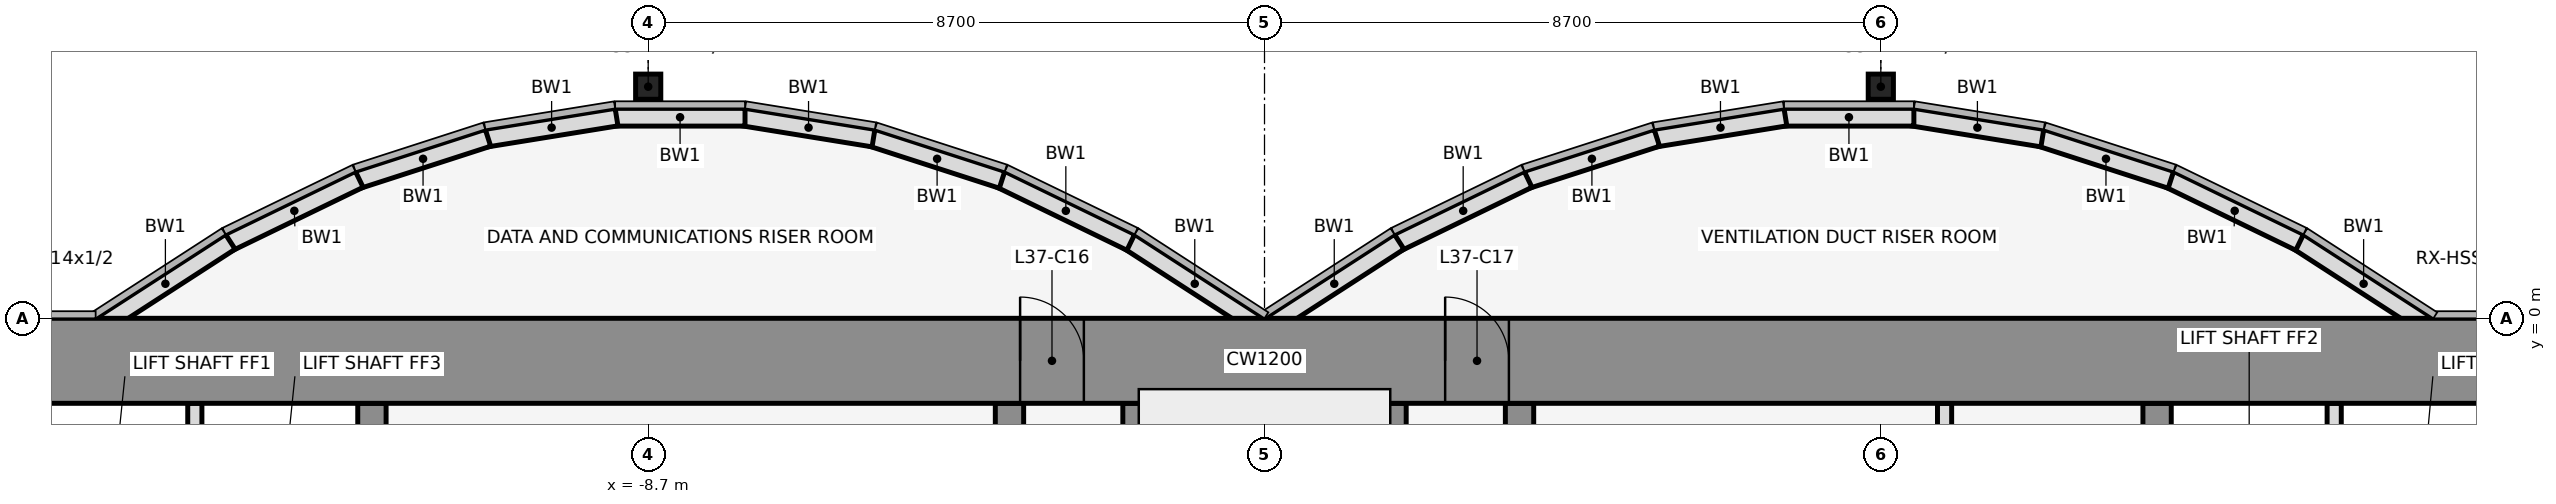
"""IFC4 building model, lengths in metres.
Left out: names, types, materials, properties, quantities, classifications, styles, units other than length and angle.
Written with IfcOpenShell. Run it as: python <this file> out.ifc"""

import sys

from ifc_helpers import new_model, si_unit, direction, frame, frame_2d, origin, origin_2d, place, context, subcontext, project, spatial, rectangle, hollow_rectangle, extrude, element, fill, save


model = new_model("IFC4")
c1 = context("Model", 3, precision=1e-05, world=origin(), true_north=direction((0.0, 1.0)))
c2 = subcontext(c1, "Body", "Model", "MODEL_VIEW")
j1 = project(units=[si_unit("LENGTHUNIT", "METRE"), si_unit("PLANEANGLEUNIT", "RADIAN")], contexts=[c1])
p1 = place(None, origin())
s1 = spatial("IfcSite", under=j1, at=p1, CompositionType="ELEMENT")
p2 = place(p1, origin())
s2 = spatial("IfcBuilding", under=s1, at=p2, CompositionType="ELEMENT")
p3 = place(p2, frame((0.0, 0.0, 169.1)))
s3 = spatial("IfcBuildingStorey", under=s2, at=p3, CompositionType="ELEMENT", Elevation=169.1)
for number, where, z_axis, x_axis in (
    (1, (-8.7, 3.269, 0.0), (0.0, 0.0, 1.0), (1.0, 0.0, 0.0)),
    (2, (8.7, 3.269, 0.0), (0.0, 0.0, 1.0), (1.0, 0.0, 0.0)),
):
    element("IfcColumn", number, at=place(p3, frame(where, z_axis=z_axis, x_axis=x_axis)), inside=s3, PredefinedType="COLUMN", context=c2, shape_type="SweptSolid", body=[
        extrude(hollow_rectangle(XDim=0.356, YDim=0.356, WallThickness=0.012, at=origin_2d()), origin(), (0.0, 0.0, 1.0), 4.1),
    ])
p4 = place(p3, frame((16.432, -0.105, 0.0), z_axis=(0.0, 0.0, 1.0), x_axis=(-0.83981312244, 0.542875602121, 0.0)))
e3 = element("IfcWall", 3, at=p4, inside=s3, PredefinedType="STANDARD", context=c2, shape_type="SweptSolid", body=[
    extrude(rectangle(XDim=2.183, YDim=0.25, at=frame_2d((1.091, 0.0))), origin(), (0.0, 0.0, 1.0), 3.95),
])
p5 = place(p3, frame((14.612, 1.073, 0.0), z_axis=(0.0, 0.0, 1.0), x_axis=(-0.89982408427, 0.436252928206, 0.0)))
e4 = element("IfcWall", 4, at=p5, inside=s3, PredefinedType="STANDARD", context=c2, shape_type="SweptSolid", body=[
    extrude(rectangle(XDim=2.038, YDim=0.25, at=frame_2d((1.019, 0.0))), origin(), (0.0, 0.0, 1.0), 3.95),
])
p6 = place(p3, frame((12.795, 1.955, 0.0), z_axis=(0.0, 0.0, 1.0), x_axis=(-0.951495806175, 0.307661714928, 0.0)))
e5 = element("IfcWall", 5, at=p6, inside=s3, PredefinedType="STANDARD", context=c2, shape_type="SweptSolid", body=[
    extrude(rectangle(XDim=1.927, YDim=0.25, at=frame_2d((0.963, 0.0))), origin(), (0.0, 0.0, 1.0), 3.95),
])
p7 = place(p3, frame((10.98, 2.543, 0.0), z_axis=(0.0, 0.0, 1.0), x_axis=(-0.987181718931, 0.159600293885, 0.0)))
e6 = element("IfcWall", 6, at=p7, inside=s3, PredefinedType="STANDARD", context=c2, shape_type="SweptSolid", body=[
    extrude(rectangle(XDim=1.857, YDim=0.25, at=frame_2d((0.929, 0.0))), origin(), (0.0, 0.0, 1.0), 3.95),
])
p8 = place(p3, frame((9.167, 2.838, 0.0), z_axis=(0.0, 0.0, 1.0), x_axis=(-1.0, 0.0, 0.0)))
e7 = element("IfcWall", 7, at=p8, inside=s3, PredefinedType="STANDARD", context=c2, shape_type="SweptSolid", body=[
    extrude(rectangle(XDim=1.833, YDim=0.25, at=frame_2d((0.917, 0.0))), origin(), (0.0, 0.0, 1.0), 3.95),
])
p9 = place(p3, frame((7.353, 2.84, 0.0), z_axis=(0.0, 0.0, 1.0), x_axis=(-0.987181718931, -0.159600293885, 0.0)))
e8 = element("IfcWall", 8, at=p9, inside=s3, PredefinedType="STANDARD", context=c2, shape_type="SweptSolid", body=[
    extrude(rectangle(XDim=1.857, YDim=0.25, at=frame_2d((0.929, 0.0))), origin(), (0.0, 0.0, 1.0), 3.95),
])
p10 = place(p3, frame((5.538, 2.548, 0.0), z_axis=(0.0, 0.0, 1.0), x_axis=(-0.951495806175, -0.307661714928, 0.0)))
e9 = element("IfcWall", 9, at=p10, inside=s3, PredefinedType="STANDARD", context=c2, shape_type="SweptSolid", body=[
    extrude(rectangle(XDim=1.927, YDim=0.25, at=frame_2d((0.963, 0.0))), origin(), (0.0, 0.0, 1.0), 3.95),
])
p11 = place(p3, frame((3.721, 1.962, 0.0), z_axis=(0.0, 0.0, 1.0), x_axis=(-0.89982408427, -0.436252928206, 0.0)))
e10 = element("IfcWall", 10, at=p11, inside=s3, PredefinedType="STANDARD", context=c2, shape_type="SweptSolid", body=[
    extrude(rectangle(XDim=2.038, YDim=0.25, at=frame_2d((1.019, 0.0))), origin(), (0.0, 0.0, 1.0), 3.95),
])
for number, where, z_axis, x_axis in (
    (11, (1.901, 1.08, 0.0), (0.0, 0.0, 1.0), (-0.84, -0.543, 0.0)),
    (12, (-0.068, -0.105, 0.0), (0.0, 0.0, 1.0), (-0.84, 0.543, 0.0)),
):
    element("IfcWall", number, at=place(p3, frame(where, z_axis=z_axis, x_axis=x_axis)), inside=s3, PredefinedType="STANDARD", context=c2, shape_type="SweptSolid", body=[
        extrude(rectangle(XDim=2.183, YDim=0.25, at=frame_2d((1.091, 0.0))), origin(), (0.0, 0.0, 1.0), 3.95),
    ])
p12 = place(p3, frame((-1.888, 1.073, 0.0), z_axis=(0.0, 0.0, 1.0), x_axis=(-0.89982408427, 0.436252928206, 0.0)))
e13 = element("IfcWall", 13, at=p12, inside=s3, PredefinedType="STANDARD", context=c2, shape_type="SweptSolid", body=[
    extrude(rectangle(XDim=2.038, YDim=0.25, at=frame_2d((1.019, 0.0))), origin(), (0.0, 0.0, 1.0), 3.95),
])
p13 = place(p3, frame((-3.705, 1.955, 0.0), z_axis=(0.0, 0.0, 1.0), x_axis=(-0.951495806175, 0.307661714928, 0.0)))
e14 = element("IfcWall", 14, at=p13, inside=s3, PredefinedType="STANDARD", context=c2, shape_type="SweptSolid", body=[
    extrude(rectangle(XDim=1.927, YDim=0.25, at=frame_2d((0.963, 0.0))), origin(), (0.0, 0.0, 1.0), 3.95),
])
p14 = place(p3, frame((-5.52, 2.543, 0.0), z_axis=(0.0, 0.0, 1.0), x_axis=(-0.987181718931, 0.159600293885, 0.0)))
e15 = element("IfcWall", 15, at=p14, inside=s3, PredefinedType="STANDARD", context=c2, shape_type="SweptSolid", body=[
    extrude(rectangle(XDim=1.857, YDim=0.25, at=frame_2d((0.929, 0.0))), origin(), (0.0, 0.0, 1.0), 3.95),
])
p15 = place(p3, frame((-7.333, 2.838, 0.0), z_axis=(0.0, 0.0, 1.0), x_axis=(-1.0, 0.0, 0.0)))
e16 = element("IfcWall", 16, at=p15, inside=s3, PredefinedType="STANDARD", context=c2, shape_type="SweptSolid", body=[
    extrude(rectangle(XDim=1.833, YDim=0.25, at=frame_2d((0.917, 0.0))), origin(), (0.0, 0.0, 1.0), 3.95),
])
p16 = place(p3, frame((-9.147, 2.84, 0.0), z_axis=(0.0, 0.0, 1.0), x_axis=(-0.987181718931, -0.159600293885, 0.0)))
e17 = element("IfcWall", 17, at=p16, inside=s3, PredefinedType="STANDARD", context=c2, shape_type="SweptSolid", body=[
    extrude(rectangle(XDim=1.857, YDim=0.25, at=frame_2d((0.929, 0.0))), origin(), (0.0, 0.0, 1.0), 3.95),
])
p17 = place(p3, frame((-10.962, 2.548, 0.0), z_axis=(0.0, 0.0, 1.0), x_axis=(-0.951495806175, -0.307661714928, 0.0)))
e18 = element("IfcWall", 18, at=p17, inside=s3, PredefinedType="STANDARD", context=c2, shape_type="SweptSolid", body=[
    extrude(rectangle(XDim=1.927, YDim=0.25, at=frame_2d((0.963, 0.0))), origin(), (0.0, 0.0, 1.0), 3.95),
])
p18 = place(p3, frame((-12.779, 1.962, 0.0), z_axis=(0.0, 0.0, 1.0), x_axis=(-0.89982408427, -0.436252928206, 0.0)))
e19 = element("IfcWall", 19, at=p18, inside=s3, PredefinedType="STANDARD", context=c2, shape_type="SweptSolid", body=[
    extrude(rectangle(XDim=2.038, YDim=0.25, at=frame_2d((1.019, 0.0))), origin(), (0.0, 0.0, 1.0), 3.95),
])
p19 = place(p3, frame((-14.599, 1.08, 0.0), z_axis=(0.0, 0.0, 1.0), x_axis=(-0.83981312244, -0.542875602121, 0.0)))
e20 = element("IfcWall", 20, at=p19, inside=s3, PredefinedType="STANDARD", context=c2, shape_type="SweptSolid", body=[
    extrude(rectangle(XDim=2.183, YDim=0.25, at=frame_2d((1.091, 0.0))), origin(), (0.0, 0.0, 1.0), 3.95),
])
p20 = place(p3, frame((-15.1, -4.6, 0.0), z_axis=(0.0, 0.0, 1.0), x_axis=(0.0, 1.0, 0.0)))
e21 = element("IfcWall", 21, at=p20, inside=s3, PredefinedType="PARTITIONING", context=c2, shape_type="SweptSolid", body=[
    extrude(rectangle(XDim=3.4, YDim=0.2, at=frame_2d((1.7, 0.0))), origin(), (0.0, 0.0, 1.0), 2.84),
])
p21 = place(p3, frame((-12.6, -11.8, 0.0), z_axis=(0.0, 0.0, 1.0), x_axis=(0.0, 1.0, 0.0)))
e22 = element("IfcWall", 22, at=p21, inside=s3, PredefinedType="SHEAR", context=c2, shape_type="SweptSolid", body=[
    extrude(rectangle(XDim=10.6, YDim=0.4, at=frame_2d((5.3, 0.0))), origin(), (0.0, 0.0, 1.0), 4.1),
])
p22 = place(p21, frame((4.75, 0.0, 0.0)))
e23 = element("IfcOpeningElement", 23, at=p22, cuts=e22, PredefinedType="OPENING", context=c2, shape_type="SweptSolid", body=[
    extrude(rectangle(XDim=1.1, YDim=2.1, at=frame_2d((0.55, 1.05))), frame((0.0, 0.212, 0.0), z_axis=(0.0, -1.0, 0.0), x_axis=(1.0, 0.0, 0.0)), (0.0, 0.0, 1.0), 0.424),
])
p23 = place(p3, frame((-3.6, -11.8, 0.0), z_axis=(0.0, 0.0, 1.0), x_axis=(0.0, 1.0, 0.0)))
e24 = element("IfcWall", 24, at=p23, inside=s3, PredefinedType="SHEAR", context=c2, shape_type="SweptSolid", body=[
    extrude(rectangle(XDim=10.6, YDim=0.4, at=frame_2d((5.3, 0.0))), origin(), (0.0, 0.0, 1.0), 4.1),
])
p24 = place(p23, frame((4.85, 0.0, 0.0)))
e25 = element("IfcOpeningElement", 25, at=p24, cuts=e24, PredefinedType="OPENING", context=c2, shape_type="SweptSolid", body=[
    extrude(rectangle(XDim=0.9, YDim=2.1, at=frame_2d((0.45, 1.05))), frame((0.0, 0.212, 0.0), z_axis=(0.0, -1.0, 0.0), x_axis=(1.0, 0.0, 0.0)), (0.0, 0.0, 1.0), 0.424),
])
for number, where, z_axis, x_axis in (
    (26, (-1.8, -11.8, 0.0), (0.0, 0.0, 1.0), (0.0, 1.0, 0.0)),
    (27, (1.8, -11.8, 0.0), (0.0, 0.0, 1.0), (0.0, 1.0, 0.0)),
):
    element("IfcWall", number, at=place(p3, frame(where, z_axis=z_axis, x_axis=x_axis)), inside=s3, PredefinedType="SHEAR", context=c2, shape_type="SweptSolid", body=[
        extrude(rectangle(XDim=10.6, YDim=0.4, at=frame_2d((5.3, 0.0))), origin(), (0.0, 0.0, 1.0), 4.1),
    ])
p25 = place(p3, frame((3.6, -11.8, 0.0), z_axis=(0.0, 0.0, 1.0), x_axis=(0.0, 1.0, 0.0)))
e28 = element("IfcWall", 28, at=p25, inside=s3, PredefinedType="SHEAR", context=c2, shape_type="SweptSolid", body=[
    extrude(rectangle(XDim=10.6, YDim=0.4, at=frame_2d((5.3, 0.0))), origin(), (0.0, 0.0, 1.0), 4.1),
])
p26 = place(p25, frame((1.35, 0.0, 0.0)))
e29 = element("IfcOpeningElement", 29, at=p26, cuts=e28, PredefinedType="OPENING", context=c2, shape_type="SweptSolid", body=[
    extrude(rectangle(XDim=0.9, YDim=2.1, at=frame_2d((0.45, 1.05))), frame((0.0, 0.212, 0.0), z_axis=(0.0, -1.0, 0.0), x_axis=(1.0, 0.0, 0.0)), (0.0, 0.0, 1.0), 0.424),
])
p27 = place(p3, frame((9.6, -4.6, 0.0), z_axis=(0.0, 0.0, 1.0), x_axis=(0.0, 1.0, 0.0)))
e30 = element("IfcWall", 30, at=p27, inside=s3, PredefinedType="PARTITIONING", context=c2, shape_type="SweptSolid", body=[
    extrude(rectangle(XDim=3.4, YDim=0.2, at=frame_2d((1.7, 0.0))), origin(), (0.0, 0.0, 1.0), 2.84),
])
p28 = place(p3, frame((12.6, -11.8, 0.0), z_axis=(0.0, 0.0, 1.0), x_axis=(0.0, 1.0, 0.0)))
e31 = element("IfcWall", 31, at=p28, inside=s3, PredefinedType="SHEAR", context=c2, shape_type="SweptSolid", body=[
    extrude(rectangle(XDim=10.6, YDim=0.4, at=frame_2d((5.3, 0.0))), origin(), (0.0, 0.0, 1.0), 4.1),
])
p29 = place(p28, frame((1.25, 0.0, 0.0)))
e32 = element("IfcOpeningElement", 32, at=p29, cuts=e31, PredefinedType="OPENING", context=c2, shape_type="SweptSolid", body=[
    extrude(rectangle(XDim=1.2, YDim=2.1, at=frame_2d((0.6, 1.05))), frame((0.0, 0.212, 0.0), z_axis=(0.0, -1.0, 0.0), x_axis=(1.0, 0.0, 0.0)), (0.0, 0.0, 1.0), 0.424),
])
p30 = place(p28, frame((4.75, 0.0, 0.0)))
e33 = element("IfcOpeningElement", 33, at=p30, cuts=e31, PredefinedType="OPENING", context=c2, shape_type="SweptSolid", body=[
    extrude(rectangle(XDim=1.1, YDim=2.1, at=frame_2d((0.55, 1.05))), frame((0.0, 0.212, 0.0), z_axis=(0.0, -1.0, 0.0), x_axis=(1.0, 0.0, 0.0)), (0.0, 0.0, 1.0), 0.424),
])
p31 = place(p3, frame((15.1, -4.6, 0.0), z_axis=(0.0, 0.0, 1.0), x_axis=(0.0, 1.0, 0.0)))
e34 = element("IfcWall", 34, at=p31, inside=s3, PredefinedType="PARTITIONING", context=c2, shape_type="SweptSolid", body=[
    extrude(rectangle(XDim=3.4, YDim=0.2, at=frame_2d((1.7, 0.0))), origin(), (0.0, 0.0, 1.0), 2.84),
])
p32 = place(p3, frame((-22.0, -0.6, 0.0), z_axis=(0.0, 0.0, 1.0), x_axis=(1.0, 0.0, 0.0)))
e35 = element("IfcWall", 35, at=p32, inside=s3, PredefinedType="SHEAR", context=c2, shape_type="SweptSolid", body=[
    extrude(rectangle(XDim=44.0, YDim=1.2, at=frame_2d((22.0, 0.0))), origin(), (0.0, 0.0, 1.0), 4.1),
])
p33 = place(p32, frame((18.55, 0.0, 0.0)))
e36 = element("IfcOpeningElement", 36, at=p33, cuts=e35, PredefinedType="OPENING", context=c2, shape_type="SweptSolid", body=[
    extrude(rectangle(XDim=0.9, YDim=2.1, at=frame_2d((0.45, 1.05))), frame((0.0, 0.612, 0.0), z_axis=(0.0, -1.0, 0.0), x_axis=(1.0, 0.0, 0.0)), (0.0, 0.0, 1.0), 1.224),
])
p34 = place(p32, frame((24.55, 0.0, 0.0)))
e37 = element("IfcOpeningElement", 37, at=p34, cuts=e35, PredefinedType="OPENING", context=c2, shape_type="SweptSolid", body=[
    extrude(rectangle(XDim=0.9, YDim=2.1, at=frame_2d((0.45, 1.05))), frame((0.0, 0.612, 0.0), z_axis=(0.0, -1.0, 0.0), x_axis=(1.0, 0.0, 0.0)), (0.0, 0.0, 1.0), 1.224),
])
p35 = place(p33, origin())
e38 = element("IfcDoor", 38, at=p35, inside=s3, OperationType="SINGLE_SWING_LEFT", PredefinedType="DOOR", context=c2, shape_type="SweptSolid", body=[
    extrude(rectangle(XDim=0.9, YDim=2.1, at=frame_2d((0.45, 1.05))), frame((0.0, 0.025, 0.0), z_axis=(0.0, -1.0, 0.0), x_axis=(1.0, 0.0, 0.0)), (0.0, 0.0, 1.0), 0.05),
])
fill(e36, e38)
p36 = place(p34, origin())
e39 = element("IfcDoor", 39, at=p36, inside=s3, OperationType="SINGLE_SWING_LEFT", PredefinedType="DOOR", context=c2, shape_type="SweptSolid", body=[
    extrude(rectangle(XDim=0.9, YDim=2.1, at=frame_2d((0.45, 1.05))), frame((0.0, 0.025, 0.0), z_axis=(0.0, -1.0, 0.0), x_axis=(1.0, 0.0, 0.0)), (0.0, 0.0, 1.0), 0.05),
])
fill(e37, e39)
save(model, sys.argv[1])
